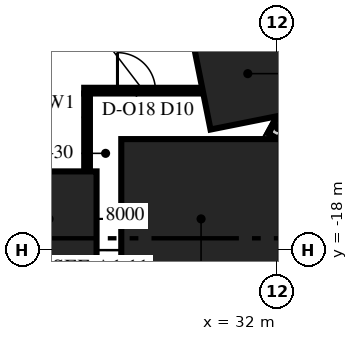
"""IFC4 building model, lengths in metres.
Left out: names, types, materials, properties, quantities, classifications, styles, units other than length and angle.
Written with IfcOpenShell. Run it as: python <this file> out.ifc"""

import sys

from ifc_helpers import new_model, si_unit, direction, frame, frame_2d, origin, origin_2d, place, context, subcontext, project, spatial, rectangle, extrude, element, fill, save


model = new_model("IFC4")
c1 = context("Model", 3, precision=1e-05, world=origin(), true_north=direction((0.0, 1.0)))
c2 = subcontext(c1, "Body", "Model", "MODEL_VIEW")
j1 = project(units=[si_unit("LENGTHUNIT", "METRE"), si_unit("PLANEANGLEUNIT", "RADIAN")], contexts=[c1])
p1 = place(None, origin())
s1 = spatial("IfcSite", under=j1, at=p1, CompositionType="ELEMENT")
p2 = place(p1, origin())
s2 = spatial("IfcBuilding", under=s1, at=p2, CompositionType="ELEMENT")
p3 = place(p2, frame((0.0, 0.0, 28.0)))
s3 = spatial("IfcBuildingStorey", under=s2, at=p3, CompositionType="ELEMENT", Elevation=28.0)
p4 = place(p3, frame((26.0, -17.175, -1.25), z_axis=(0.0, 0.0, 1.0), x_axis=(1.0, 0.0, 0.0)))
e1 = element("IfcColumn", 1, at=p4, inside=s3, PredefinedType="COLUMN", context=c2, shape_type="SweptSolid", body=[
    extrude(rectangle(XDim=2.5, YDim=2.5, at=origin_2d()), origin(), (0.0, 0.0, 1.0), 5.25),
])
p5 = place(p3, frame((30.0, -17.175, -1.25), z_axis=(0.0, 0.0, 1.0), x_axis=(1.0, 0.0, 0.0)))
e2 = element("IfcColumn", 2, at=p5, inside=s3, PredefinedType="COLUMN", context=c2, shape_type="SweptSolid", body=[
    extrude(rectangle(XDim=4.2, YDim=4.2, at=origin_2d()), origin(), (0.0, 0.0, 1.0), 5.25),
])
p6 = place(p3, frame((31.229, -13.353, -0.85), z_axis=(0.0, 0.0, 1.0), x_axis=(-0.196116135138, 0.980580675691, 0.0)))
e3 = element("IfcColumn", 3, at=p6, inside=s3, PredefinedType="COLUMN", context=c2, shape_type="SweptSolid", body=[
    extrude(rectangle(XDim=2.5, YDim=2.5, at=origin_2d()), origin(), (0.0, 0.0, 1.0), 4.85),
])
p7 = place(p3, frame((31.905, -15.004, 0.0), z_axis=(0.0, 0.0, 1.0), x_axis=(0.481848081358, 0.876254772593, 0.0)))
e4 = element("IfcWall", 4, at=p7, inside=s3, PredefinedType="SOLIDWALL", context=c2, shape_type="SweptSolid", body=[
    extrude(rectangle(XDim=0.531, YDim=0.3, at=frame_2d((0.265, 0.0))), origin(), (0.0, 0.0, 1.0), 4.0),
])
p8 = place(p3, frame((26.925, -13.8, 0.0), z_axis=(0.0, 0.0, 1.0), x_axis=(1.0, 0.0, 0.0)))
e5 = element("IfcWall", 5, at=p8, inside=s3, PredefinedType="PARTITIONING", context=c2, shape_type="SweptSolid", body=[
    extrude(rectangle(XDim=3.119, YDim=0.15, at=frame_2d((1.56, 0.0))), origin(), (0.0, 0.0, 1.0), 3.85),
])
p9 = place(p8, frame((0.875, 0.0, 0.0)))
e6 = element("IfcOpeningElement", 6, at=p9, cuts=e5, PredefinedType="OPENING", context=c2, shape_type="SweptSolid", body=[
    extrude(rectangle(XDim=1.0, YDim=2.3, at=frame_2d((0.5, 1.15))), frame((0.0, 0.09, 0.0), z_axis=(0.0, -1.0, 0.0), x_axis=(1.0, 0.0, 0.0)), (0.0, 0.0, 1.0), 0.18),
])
p10 = place(p3, frame((27.0, -15.925, 0.0), z_axis=(0.0, 0.0, 1.0), x_axis=(0.0, 1.0, 0.0)))
e7 = element("IfcWall", 7, at=p10, inside=s3, PredefinedType="PARTITIONING", context=c2, shape_type="SweptSolid", body=[
    extrude(rectangle(XDim=2.05, YDim=0.15, at=frame_2d((1.025, 0.0))), origin(), (0.0, 0.0, 1.0), 3.85),
])
p11 = place(p9, origin())
e8 = element("IfcDoor", 8, at=p11, inside=s3, OperationType="SINGLE_SWING_LEFT", PredefinedType="DOOR", context=c2, shape_type="SweptSolid", body=[
    extrude(rectangle(XDim=1.0, YDim=2.3, at=frame_2d((0.5, 1.15))), frame((0.0, 0.075, 0.0), z_axis=(0.0, -1.0, 0.0), x_axis=(1.0, 0.0, 0.0)), (0.0, 0.0, 1.0), 0.149),
])
fill(e6, e8)
save(model, sys.argv[1])
